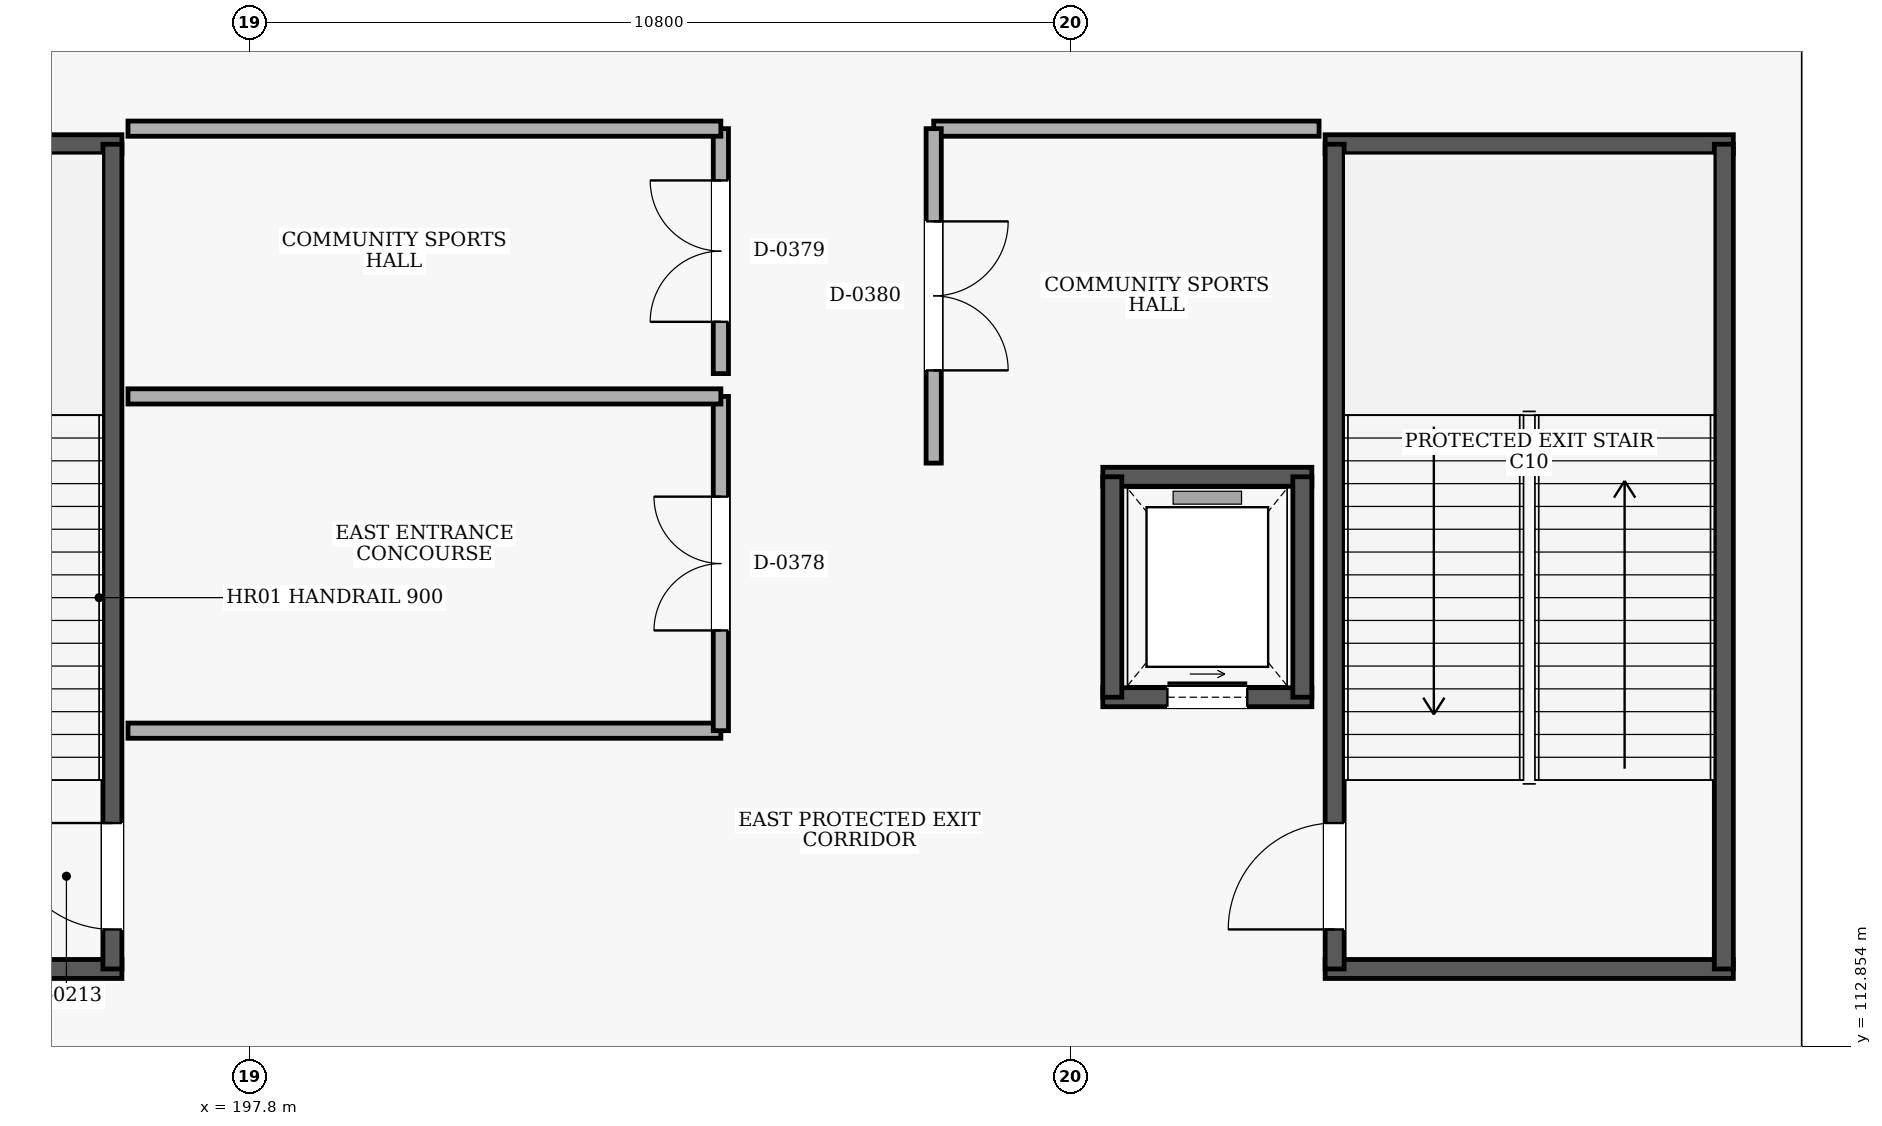
"""IFC4 building model, lengths in metres.
Left out: names, types, materials, properties, quantities, classifications, styles, units other than length and angle.
Written with IfcOpenShell. Run it as: python <this file> out.ifc"""

import sys

from ifc_helpers import new_model, si_unit, direction, frame, frame_2d, origin, place, context, subcontext, project, spatial, rectangle, extrude, element, fill, save


model = new_model("IFC4")
c1 = context("Model", 3, precision=1e-05, world=origin(), true_north=direction((0.0, 1.0)))
c2 = subcontext(c1, "Body", "Model", "MODEL_VIEW")
j1 = project(units=[si_unit("LENGTHUNIT", "METRE"), si_unit("PLANEANGLEUNIT", "RADIAN")], contexts=[c1])
p1 = place(None, origin())
s1 = spatial("IfcSite", under=j1, at=p1, CompositionType="ELEMENT")
p2 = place(p1, origin())
s2 = spatial("IfcBuilding", under=s1, at=p2, CompositionType="ELEMENT")
p3 = place(p2, origin())
s3 = spatial("IfcBuildingStorey", under=s2, at=p3, CompositionType="ELEMENT", Elevation=0.0)
for number, where, z_axis, x_axis in (
    (1, (211.95, 113.875, 0.0), (0.0, 0.0, 1.0), (1.0, 0.0, 0.0)),
    (2, (217.32, 124.725, 0.0), (0.0, 0.0, 1.0), (-1.0, 0.0, 0.0)),
):
    element("IfcWall", number, at=place(p3, frame(where, z_axis=z_axis, x_axis=x_axis)), inside=s3, PredefinedType="SHEAR", context=c2, shape_type="SweptSolid", body=[
        extrude(rectangle(XDim=5.37, YDim=0.25, at=frame_2d((2.685, 0.0))), origin(), (0.0, 0.0, 1.0), 5.08),
    ])
p4 = place(p3, frame((212.075, 113.875, 0.0), z_axis=(0.0, 0.0, 1.0), x_axis=(0.0, 1.0, 0.0)))
e3 = element("IfcWall", 3, at=p4, inside=s3, PredefinedType="SHEAR", context=c2, shape_type="SweptSolid", body=[
    extrude(rectangle(XDim=10.85, YDim=0.25, at=frame_2d((5.425, 0.0))), origin(), (0.0, 0.0, 1.0), 5.08),
])
p5 = place(p4, frame((0.52, 0.0, 0.0)))
e4 = element("IfcOpeningElement", 4, at=p5, cuts=e3, PredefinedType="OPENING", context=c2, shape_type="SweptSolid", body=[
    extrude(rectangle(XDim=1.4, YDim=2.15, at=frame_2d((0.7, 1.075))), frame((0.0, 0.135, 0.0), z_axis=(0.0, -1.0, 0.0), x_axis=(1.0, 0.0, 0.0)), (0.0, 0.0, 1.0), 0.27),
])
p6 = place(p3, frame((217.195, 113.875, 0.0), z_axis=(0.0, 0.0, 1.0), x_axis=(0.0, 1.0, 0.0)))
e5 = element("IfcWall", 5, at=p6, inside=s3, PredefinedType="SHEAR", context=c2, shape_type="SweptSolid", body=[
    extrude(rectangle(XDim=10.85, YDim=0.25, at=frame_2d((5.425, 0.0))), origin(), (0.0, 0.0, 1.0), 5.08),
])
for number, where, z_axis, x_axis in (
    (6, (190.75, 113.875, 0.0), (0.0, 0.0, 1.0), (1.0, 0.0, 0.0)),
    (7, (196.12, 124.725, 0.0), (0.0, 0.0, 1.0), (-1.0, 0.0, 0.0)),
):
    element("IfcWall", number, at=place(p3, frame(where, z_axis=z_axis, x_axis=x_axis)), inside=s3, PredefinedType="SHEAR", context=c2, shape_type="SweptSolid", body=[
        extrude(rectangle(XDim=5.37, YDim=0.25, at=frame_2d((2.685, 0.0))), origin(), (0.0, 0.0, 1.0), 5.08),
    ])
p7 = place(p3, frame((195.995, 113.875, 0.0), z_axis=(0.0, 0.0, 1.0), x_axis=(0.0, 1.0, 0.0)))
e8 = element("IfcWall", 8, at=p7, inside=s3, PredefinedType="SHEAR", context=c2, shape_type="SweptSolid", body=[
    extrude(rectangle(XDim=10.85, YDim=0.25, at=frame_2d((5.425, 0.0))), origin(), (0.0, 0.0, 1.0), 5.08),
])
p8 = place(p7, frame((0.52, 0.0, 0.0)))
e9 = element("IfcOpeningElement", 9, at=p8, cuts=e8, PredefinedType="OPENING", context=c2, shape_type="SweptSolid", body=[
    extrude(rectangle(XDim=1.4, YDim=2.15, at=frame_2d((0.7, 1.075))), frame((0.0, 0.135, 0.0), z_axis=(0.0, -1.0, 0.0), x_axis=(1.0, 0.0, 0.0)), (0.0, 0.0, 1.0), 0.27),
])
p9 = place(p3, frame((209.025, 117.45, 0.0), z_axis=(0.0, 0.0, 1.0), x_axis=(1.0, 0.0, 0.0)))
e10 = element("IfcWall", 10, at=p9, inside=s3, PredefinedType="SHEAR", context=c2, shape_type="SweptSolid", body=[
    extrude(rectangle(XDim=2.75, YDim=0.25, at=frame_2d((1.375, 0.0))), origin(), (0.0, 0.0, 1.0), 5.08),
])
p10 = place(p9, frame((0.85, 0.0, 0.0)))
e11 = element("IfcOpeningElement", 11, at=p10, cuts=e10, PredefinedType="OPENING", context=c2, shape_type="SweptSolid", body=[
    extrude(rectangle(XDim=1.05, YDim=2.15, at=frame_2d((0.525, 1.075))), frame((0.0, 0.135, 0.0), z_axis=(0.0, -1.0, 0.0), x_axis=(1.0, 0.0, 0.0)), (0.0, 0.0, 1.0), 0.27),
])
p11 = place(p3, frame((211.775, 120.35, 0.0), z_axis=(0.0, 0.0, 1.0), x_axis=(-1.0, 0.0, 0.0)))
e12 = element("IfcWall", 12, at=p11, inside=s3, PredefinedType="SHEAR", context=c2, shape_type="SweptSolid", body=[
    extrude(rectangle(XDim=2.75, YDim=0.25, at=frame_2d((1.375, 0.0))), origin(), (0.0, 0.0, 1.0), 5.08),
])
for number, where, z_axis, x_axis in (
    (13, (209.15, 120.35, 0.0), (0.0, 0.0, 1.0), (0.0, -1.0, 0.0)),
    (14, (211.65, 117.45, 0.0), (0.0, 0.0, 1.0), (0.0, 1.0, 0.0)),
):
    element("IfcWall", number, at=place(p3, frame(where, z_axis=z_axis, x_axis=x_axis)), inside=s3, PredefinedType="SHEAR", context=c2, shape_type="SweptSolid", body=[
        extrude(rectangle(XDim=2.9, YDim=0.25, at=frame_2d((1.45, 0.0))), origin(), (0.0, 0.0, 1.0), 5.08),
    ])
p12 = place(p3, frame((196.2, 117.01, 0.0), z_axis=(0.0, 0.0, 1.0), x_axis=(1.0, 0.0, 0.0)))
e15 = element("IfcWall", 15, at=p12, inside=s3, PredefinedType="PARTITIONING", context=c2, shape_type="SweptSolid", body=[
    extrude(rectangle(XDim=7.8, YDim=0.2, at=frame_2d((3.9, 0.0))), origin(), (0.0, 0.0, 1.0), 5.08),
])
p13 = place(p3, frame((204.0, 117.01, 0.0), z_axis=(0.0, 0.0, 1.0), x_axis=(0.0, 1.0, 0.0)))
e16 = element("IfcWall", 16, at=p13, inside=s3, PredefinedType="PARTITIONING", context=c2, shape_type="SweptSolid", body=[
    extrude(rectangle(XDim=4.397, YDim=0.2, at=frame_2d((2.199, 0.0))), origin(), (0.0, 0.0, 1.0), 5.08),
])
p14 = place(p13, frame((1.319, 0.0, 0.0)))
e17 = element("IfcOpeningElement", 17, at=p14, cuts=e16, PredefinedType="OPENING", context=c2, shape_type="SweptSolid", body=[
    extrude(rectangle(XDim=1.76, YDim=2.25, at=frame_2d((0.88, 1.125))), frame((0.0, 0.11, 0.0), z_axis=(0.0, -1.0, 0.0), x_axis=(1.0, 0.0, 0.0)), (0.0, 0.0, 1.0), 0.22),
])
p15 = place(p3, frame((204.0, 121.407, 0.0), z_axis=(0.0, 0.0, 1.0), x_axis=(-1.0, 0.0, 0.0)))
e18 = element("IfcWall", 18, at=p15, inside=s3, PredefinedType="PARTITIONING", context=c2, shape_type="SweptSolid", body=[
    extrude(rectangle(XDim=7.8, YDim=0.2, at=frame_2d((3.9, 0.0))), origin(), (0.0, 0.0, 1.0), 5.08),
])
p16 = place(p3, frame((204.0, 121.708, 0.0), z_axis=(0.0, 0.0, 1.0), x_axis=(0.0, 1.0, 0.0)))
e19 = element("IfcWall", 19, at=p16, inside=s3, PredefinedType="PARTITIONING", context=c2, shape_type="SweptSolid", body=[
    extrude(rectangle(XDim=3.222, YDim=0.2, at=frame_2d((1.611, 0.0))), origin(), (0.0, 0.0, 1.0), 5.08),
])
p17 = place(p16, frame((0.681, 0.0, 0.0)))
e20 = element("IfcOpeningElement", 20, at=p17, cuts=e19, PredefinedType="OPENING", context=c2, shape_type="SweptSolid", body=[
    extrude(rectangle(XDim=1.86, YDim=2.3, at=frame_2d((0.93, 1.15))), frame((0.0, 0.11, 0.0), z_axis=(0.0, -1.0, 0.0), x_axis=(1.0, 0.0, 0.0)), (0.0, 0.0, 1.0), 0.22),
])
p18 = place(p3, frame((204.0, 124.93, 0.0), z_axis=(0.0, 0.0, 1.0), x_axis=(-1.0, 0.0, 0.0)))
e21 = element("IfcWall", 21, at=p18, inside=s3, PredefinedType="PARTITIONING", context=c2, shape_type="SweptSolid", body=[
    extrude(rectangle(XDim=7.8, YDim=0.2, at=frame_2d((3.9, 0.0))), origin(), (0.0, 0.0, 1.0), 5.08),
])
p19 = place(p3, frame((211.87, 124.93, 0.0), z_axis=(0.0, 0.0, 1.0), x_axis=(-1.0, 0.0, 0.0)))
e22 = element("IfcWall", 22, at=p19, inside=s3, PredefinedType="PARTITIONING", context=c2, shape_type="SweptSolid", body=[
    extrude(rectangle(XDim=5.07, YDim=0.2, at=frame_2d((2.535, 0.0))), origin(), (0.0, 0.0, 1.0), 5.08),
])
p20 = place(p3, frame((206.8, 124.93, 0.0), z_axis=(0.0, 0.0, 1.0), x_axis=(0.0, -1.0, 0.0)))
e23 = element("IfcWall", 23, at=p20, inside=s3, PredefinedType="PARTITIONING", context=c2, shape_type="SweptSolid", body=[
    extrude(rectangle(XDim=4.4, YDim=0.2, at=frame_2d((2.2, 0.0))), origin(), (0.0, 0.0, 1.0), 5.08),
])
p21 = place(p20, frame((1.22, 0.0, 0.0)))
e24 = element("IfcOpeningElement", 24, at=p21, cuts=e23, PredefinedType="OPENING", context=c2, shape_type="SweptSolid", body=[
    extrude(rectangle(XDim=1.96, YDim=2.3, at=frame_2d((0.98, 1.15))), frame((0.0, 0.11, 0.0), z_axis=(0.0, -1.0, 0.0), x_axis=(1.0, 0.0, 0.0)), (0.0, 0.0, 1.0), 0.22),
])
p22 = place(p5, origin())
e25 = element("IfcDoor", 25, at=p22, inside=s3, OperationType="SINGLE_SWING_LEFT", PredefinedType="DOOR", context=c2, shape_type="SweptSolid", body=[
    extrude(rectangle(XDim=1.4, YDim=2.15, at=frame_2d((0.7, 1.075))), frame((0.0, 0.025, 0.0), z_axis=(0.0, -1.0, 0.0), x_axis=(1.0, 0.0, 0.0)), (0.0, 0.0, 1.0), 0.05),
])
fill(e4, e25)
p23 = place(p8, frame((1.4, 0.0, 0.0), z_axis=(0.0, 0.0, 1.0), x_axis=(-1.0, 0.0, 0.0)))
e26 = element("IfcDoor", 26, at=p23, inside=s3, OperationType="SINGLE_SWING_LEFT", PredefinedType="DOOR", context=c2, shape_type="SweptSolid", body=[
    extrude(rectangle(XDim=1.4, YDim=2.15, at=frame_2d((0.7, 1.075))), frame((0.0, 0.025, 0.0), z_axis=(0.0, -1.0, 0.0), x_axis=(1.0, 0.0, 0.0)), (0.0, 0.0, 1.0), 0.05),
])
fill(e9, e26)
p24 = place(p10, origin())
e27 = element("IfcDoor", 27, at=p24, inside=s3, OperationType="SLIDING_TO_LEFT", PredefinedType="DOOR", context=c2, shape_type="SweptSolid", body=[
    extrude(rectangle(XDim=1.05, YDim=2.15, at=frame_2d((0.525, 1.075))), frame((0.0, 0.025, 0.0), z_axis=(0.0, -1.0, 0.0), x_axis=(1.0, 0.0, 0.0)), (0.0, 0.0, 1.0), 0.05),
])
fill(e11, e27)
p25 = place(p14, origin())
e28 = element("IfcDoor", 28, at=p25, inside=s3, OperationType="DOUBLE_DOOR_SINGLE_SWING", PredefinedType="DOOR", context=c2, shape_type="SweptSolid", body=[
    extrude(rectangle(XDim=1.76, YDim=2.25, at=frame_2d((0.88, 1.125))), frame((0.0, 0.025, 0.0), z_axis=(0.0, -1.0, 0.0), x_axis=(1.0, 0.0, 0.0)), (0.0, 0.0, 1.0), 0.05),
])
fill(e17, e28)
p26 = place(p17, origin())
e29 = element("IfcDoor", 29, at=p26, inside=s3, OperationType="DOUBLE_DOOR_SINGLE_SWING", PredefinedType="DOOR", context=c2, shape_type="SweptSolid", body=[
    extrude(rectangle(XDim=1.86, YDim=2.3, at=frame_2d((0.93, 1.15))), frame((0.0, 0.025, 0.0), z_axis=(0.0, -1.0, 0.0), x_axis=(1.0, 0.0, 0.0)), (0.0, 0.0, 1.0), 0.05),
])
fill(e20, e29)
p27 = place(p21, origin())
e30 = element("IfcDoor", 30, at=p27, inside=s3, OperationType="DOUBLE_DOOR_SINGLE_SWING", PredefinedType="DOOR", context=c2, shape_type="SweptSolid", body=[
    extrude(rectangle(XDim=1.96, YDim=2.3, at=frame_2d((0.98, 1.15))), frame((0.0, 0.025, 0.0), z_axis=(0.0, -1.0, 0.0), x_axis=(1.0, 0.0, 0.0)), (0.0, 0.0, 1.0), 0.05),
])
fill(e24, e30)
save(model, sys.argv[1])
